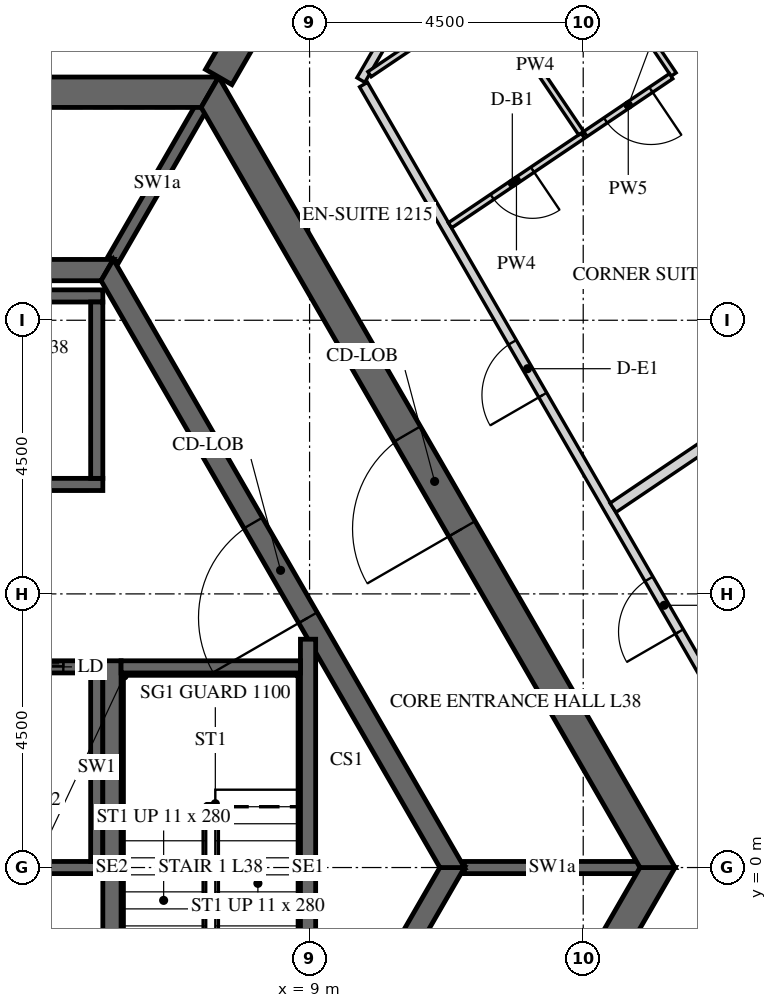
"""IFC4 building model, lengths in metres.
Left out: names, types, materials, properties, quantities, classifications, styles, units other than length and angle.
Written with IfcOpenShell. Run it as: python <this file> out.ifc"""

import sys

from ifc_helpers import new_model, si_unit, direction, frame, frame_2d, origin, place, context, subcontext, project, spatial, polyline, rectangle, outline, extrude, element, fill, save


model = new_model("IFC4")
c1 = context("Model", 3, precision=1e-05, world=origin(), true_north=direction((0.0, 1.0)))
c2 = subcontext(c1, "Body", "Model", "MODEL_VIEW")
j1 = project(units=[si_unit("LENGTHUNIT", "METRE"), si_unit("PLANEANGLEUNIT", "RADIAN")], contexts=[c1])
p1 = place(None, origin())
s1 = spatial("IfcSite", under=j1, at=p1, CompositionType="ELEMENT")
p2 = place(p1, origin())
s2 = spatial("IfcBuilding", under=s1, at=p2, CompositionType="ELEMENT")
p3 = place(p2, frame((0.0, 0.0, 164.4)))
s3 = spatial("IfcBuildingStorey", under=s2, at=p3, CompositionType="ELEMENT", Elevation=164.4)
p4 = place(p3, frame((7.361, -12.75, -0.15), z_axis=(0.0, 0.0, 1.0), x_axis=(0.50000571537, 0.866022103989, 0.0)))
e1 = element("IfcWall", 1, at=p4, inside=s3, PredefinedType="SHEAR", context=c2, shape_type="SweptSolid", body=[
    extrude(outline(polyline([(-0.144, -0.25), (14.867, -0.25), (14.578, 0.25), (0.144, 0.25), (-0.144, -0.25)])), origin(), (0.0, 0.0, 1.0), 3.9),
])
p5 = place(p4, frame((6.49, 0.0, 0.15)))
e2 = element("IfcOpeningElement", 2, at=p5, cuts=e1, PredefinedType="OPENING", context=c2, shape_type="SweptSolid", body=[
    extrude(rectangle(XDim=1.8, YDim=2.4, at=frame_2d((0.9, 1.2))), frame((0.0, 0.26, 0.0), z_axis=(0.0, -1.0, 0.0), x_axis=(1.0, 0.0, 0.0)), (0.0, 0.0, 1.0), 0.52),
])
p6 = place(p3, frame((14.722, 0.0, -0.15), z_axis=(0.0, 0.0, 1.0), x_axis=(-0.50000571537, 0.866022103989, 0.0)))
e3 = element("IfcWall", 3, at=p6, inside=s3, PredefinedType="SHEAR", context=c2, shape_type="SweptSolid", body=[
    extrude(outline(polyline([(-0.144, -0.25), (14.867, -0.25), (14.578, 0.25), (0.144, 0.25), (-0.144, -0.25)])), origin(), (0.0, 0.0, 1.0), 3.9),
])
p7 = place(p6, frame((6.432, 0.0, 0.15)))
e4 = element("IfcOpeningElement", 4, at=p7, cuts=e3, PredefinedType="OPENING", context=c2, shape_type="SweptSolid", body=[
    extrude(rectangle(XDim=1.8, YDim=2.4, at=frame_2d((0.9, 1.2))), frame((0.0, 0.26, 0.0), z_axis=(0.0, -1.0, 0.0), x_axis=(1.0, 0.0, 0.0)), (0.0, 0.0, 1.0), 0.52),
])
p8 = place(p3, frame((7.361, 12.75, -0.15), z_axis=(0.0, 0.0, 1.0), x_axis=(-1.0, 0.0, 0.0)))
e5 = element("IfcWall", 5, at=p8, inside=s3, PredefinedType="SHEAR", context=c2, shape_type="SweptSolid", body=[
    extrude(outline(polyline([(-0.144, -0.25), (14.866, -0.25), (14.578, 0.25), (0.144, 0.25), (-0.144, -0.25)])), origin(), (0.0, 0.0, 1.0), 3.9),
])
p9 = place(p8, frame((6.761, 0.0, 0.15)))
e6 = element("IfcOpeningElement", 6, at=p9, cuts=e5, PredefinedType="OPENING", context=c2, shape_type="SweptSolid", body=[
    extrude(rectangle(XDim=1.2, YDim=2.4, at=frame_2d((0.6, 1.2))), frame((0.0, 0.26, 0.0), z_axis=(0.0, -1.0, 0.0), x_axis=(1.0, 0.0, 0.0)), (0.0, 0.0, 1.0), 0.52),
])
p10 = place(p3, frame((7.506, 13.0, -0.15), z_axis=(0.0, 0.0, 1.0), x_axis=(0.499988271576, 0.866032175087, 0.0)))
e7 = element("IfcWall", 7, at=p10, inside=s3, PredefinedType="SHEAR", context=c2, shape_type="SweptSolid", body=[
    extrude(rectangle(XDim=15.424, YDim=0.5, at=frame_2d((7.712, 0.0))), origin(), (0.0, 0.0, 1.0), 3.9),
])
p11 = place(p10, frame((6.812, 0.0, 0.15)))
e8 = element("IfcOpeningElement", 8, at=p11, cuts=e7, PredefinedType="OPENING", context=c2, shape_type="SweptSolid", body=[
    extrude(rectangle(XDim=1.8, YDim=2.4, at=frame_2d((0.9, 1.2))), frame((0.0, 0.26, 0.0), z_axis=(0.0, -1.0, 0.0), x_axis=(1.0, 0.0, 0.0)), (0.0, 0.0, 1.0), 0.52),
])
p12 = place(p3, frame((5.673, -9.825, -0.15), z_axis=(0.0, 0.0, 1.0), x_axis=(0.499995046907, 0.866028263435, 0.0)))
e9 = element("IfcWall", 9, at=p12, inside=s3, PredefinedType="SHEAR", context=c2, shape_type="SweptSolid", body=[
    extrude(outline(polyline([(-0.101, -0.175), (11.446, -0.175), (11.244, 0.175), (0.101, 0.175), (-0.101, -0.175)])), origin(), (0.0, 0.0, 1.0), 3.9),
])
p13 = place(p12, frame((4.801, 0.0, 0.15)))
e10 = element("IfcOpeningElement", 10, at=p13, cuts=e9, PredefinedType="OPENING", context=c2, shape_type="SweptSolid", body=[
    extrude(rectangle(XDim=1.8, YDim=2.4, at=frame_2d((0.9, 1.2))), frame((0.0, 0.185, 0.0), z_axis=(0.0, -1.0, 0.0), x_axis=(1.0, 0.0, 0.0)), (0.0, 0.0, 1.0), 0.37),
])
p14 = place(p3, frame((11.345, 0.0, -0.15), z_axis=(0.0, 0.0, 1.0), x_axis=(-0.499995046907, 0.866028263435, 0.0)))
e11 = element("IfcWall", 11, at=p14, inside=s3, PredefinedType="SHEAR", context=c2, shape_type="SweptSolid", body=[
    extrude(outline(polyline([(-0.101, -0.175), (11.446, -0.175), (11.244, 0.175), (0.101, 0.175), (-0.101, -0.175)])), origin(), (0.0, 0.0, 1.0), 3.9),
])
p15 = place(p14, frame((4.744, 0.0, 0.15)))
e12 = element("IfcOpeningElement", 12, at=p15, cuts=e11, PredefinedType="OPENING", context=c2, shape_type="SweptSolid", body=[
    extrude(rectangle(XDim=1.8, YDim=2.4, at=frame_2d((0.9, 1.2))), frame((0.0, 0.185, 0.0), z_axis=(0.0, -1.0, 0.0), x_axis=(1.0, 0.0, 0.0)), (0.0, 0.0, 1.0), 0.37),
])
p16 = place(p3, frame((5.673, 9.825, -0.15), z_axis=(0.0, 0.0, 1.0), x_axis=(-1.0, 0.0, 0.0)))
e13 = element("IfcWall", 13, at=p16, inside=s3, PredefinedType="SHEAR", context=c2, shape_type="SweptSolid", body=[
    extrude(outline(polyline([(-0.101, -0.175), (11.446, -0.175), (11.244, 0.175), (0.101, 0.175), (-0.101, -0.175)])), origin(), (0.0, 0.0, 1.0), 3.9),
])
p17 = place(p3, frame((-5.6, 6.3, -0.25), z_axis=(0.0, 0.0, 1.0), x_axis=(1.0, 0.0, 0.0)))
e14 = element("IfcWall", 14, at=p17, inside=s3, PredefinedType="SHEAR", context=c2, shape_type="SweptSolid", body=[
    extrude(rectangle(XDim=11.2, YDim=0.2, at=frame_2d((5.6, 0.0))), origin(), (0.0, 0.0, 1.0), 3.9),
])
p18 = place(p17, frame((8.45, 0.0, 0.25)))
e15 = element("IfcOpeningElement", 15, at=p18, cuts=e14, PredefinedType="OPENING", context=c2, shape_type="SweptSolid", body=[
    extrude(rectangle(XDim=0.9, YDim=2.1, at=frame_2d((0.45, 1.05))), frame((0.0, 0.11, 0.0), z_axis=(0.0, -1.0, 0.0), x_axis=(1.0, 0.0, 0.0)), (0.0, 0.0, 1.0), 0.22),
])
p19 = place(p17, frame((0.65, 0.0, 0.25)))
e16 = element("IfcOpeningElement", 16, at=p19, cuts=e14, PredefinedType="OPENING", context=c2, shape_type="SweptSolid", body=[
    extrude(rectangle(XDim=1.1, YDim=2.1, at=frame_2d((0.55, 1.05))), frame((0.0, 0.11, 0.0), z_axis=(0.0, -1.0, 0.0), x_axis=(1.0, 0.0, 0.0)), (0.0, 0.0, 1.0), 0.22),
])
p20 = place(p17, frame((2.85, 0.0, 0.25)))
e17 = element("IfcOpeningElement", 17, at=p20, cuts=e14, PredefinedType="OPENING", context=c2, shape_type="SweptSolid", body=[
    extrude(rectangle(XDim=1.1, YDim=2.1, at=frame_2d((0.55, 1.05))), frame((0.0, 0.11, 0.0), z_axis=(0.0, -1.0, 0.0), x_axis=(1.0, 0.0, 0.0)), (0.0, 0.0, 1.0), 0.22),
])
p21 = place(p17, frame((5.05, 0.0, 0.25)))
e18 = element("IfcOpeningElement", 18, at=p21, cuts=e14, PredefinedType="OPENING", context=c2, shape_type="SweptSolid", body=[
    extrude(rectangle(XDim=1.1, YDim=2.1, at=frame_2d((0.55, 1.05))), frame((0.0, 0.11, 0.0), z_axis=(0.0, -1.0, 0.0), x_axis=(1.0, 0.0, 0.0)), (0.0, 0.0, 1.0), 0.22),
])
p22 = place(p3, frame((-5.6, 9.4, -0.25), z_axis=(0.0, 0.0, 1.0), x_axis=(1.0, 0.0, 0.0)))
e19 = element("IfcWall", 19, at=p22, inside=s3, PredefinedType="SHEAR", context=c2, shape_type="SweptSolid", body=[
    extrude(rectangle(XDim=11.2, YDim=0.2, at=frame_2d((5.6, 0.0))), origin(), (0.0, 0.0, 1.0), 3.9),
])
p23 = place(p3, frame((5.5, 6.4, -0.25), z_axis=(0.0, 0.0, 1.0), x_axis=(0.0, 1.0, 0.0)))
e20 = element("IfcWall", 20, at=p23, inside=s3, PredefinedType="SHEAR", context=c2, shape_type="SweptSolid", body=[
    extrude(rectangle(XDim=2.9, YDim=0.2, at=frame_2d((1.45, 0.0))), origin(), (0.0, 0.0, 1.0), 3.9),
])
p24 = place(p3, frame((-5.6, 3.3, -0.25), z_axis=(0.0, 0.0, 1.0), x_axis=(1.0, 0.0, 0.0)))
e21 = element("IfcWall", 21, at=p24, inside=s3, PredefinedType="SHEAR", context=c2, shape_type="SweptSolid", body=[
    extrude(rectangle(XDim=11.2, YDim=0.2, at=frame_2d((5.6, 0.0))), origin(), (0.0, 0.0, 1.0), 3.9),
])
p25 = place(p24, frame((0.65, 0.0, 0.25)))
e22 = element("IfcOpeningElement", 22, at=p25, cuts=e21, PredefinedType="OPENING", context=c2, shape_type="SweptSolid", body=[
    extrude(rectangle(XDim=1.1, YDim=2.1, at=frame_2d((0.55, 1.05))), frame((0.0, 0.11, 0.0), z_axis=(0.0, -1.0, 0.0), x_axis=(1.0, 0.0, 0.0)), (0.0, 0.0, 1.0), 0.22),
])
p26 = place(p24, frame((2.85, 0.0, 0.25)))
e23 = element("IfcOpeningElement", 23, at=p26, cuts=e21, PredefinedType="OPENING", context=c2, shape_type="SweptSolid", body=[
    extrude(rectangle(XDim=1.1, YDim=2.1, at=frame_2d((0.55, 1.05))), frame((0.0, 0.11, 0.0), z_axis=(0.0, -1.0, 0.0), x_axis=(1.0, 0.0, 0.0)), (0.0, 0.0, 1.0), 0.22),
])
p27 = place(p24, frame((5.05, 0.0, 0.25)))
e24 = element("IfcOpeningElement", 24, at=p27, cuts=e21, PredefinedType="OPENING", context=c2, shape_type="SweptSolid", body=[
    extrude(rectangle(XDim=1.1, YDim=2.1, at=frame_2d((0.55, 1.05))), frame((0.0, 0.11, 0.0), z_axis=(0.0, -1.0, 0.0), x_axis=(1.0, 0.0, 0.0)), (0.0, 0.0, 1.0), 0.22),
])
p28 = place(p24, frame((7.25, 0.0, 0.25)))
e25 = element("IfcOpeningElement", 25, at=p28, cuts=e21, PredefinedType="OPENING", context=c2, shape_type="SweptSolid", body=[
    extrude(rectangle(XDim=1.1, YDim=2.1, at=frame_2d((0.55, 1.05))), frame((0.0, 0.11, 0.0), z_axis=(0.0, -1.0, 0.0), x_axis=(1.0, 0.0, 0.0)), (0.0, 0.0, 1.0), 0.22),
])
p29 = place(p24, frame((9.45, 0.0, 0.25)))
e26 = element("IfcOpeningElement", 26, at=p29, cuts=e21, PredefinedType="OPENING", context=c2, shape_type="SweptSolid", body=[
    extrude(rectangle(XDim=1.1, YDim=2.1, at=frame_2d((0.55, 1.05))), frame((0.0, 0.11, 0.0), z_axis=(0.0, -1.0, 0.0), x_axis=(1.0, 0.0, 0.0)), (0.0, 0.0, 1.0), 0.22),
])
p30 = place(p3, frame((-5.6, 0.0, -0.25), z_axis=(0.0, 0.0, 1.0), x_axis=(1.0, 0.0, 0.0)))
e27 = element("IfcWall", 27, at=p30, inside=s3, PredefinedType="SHEAR", context=c2, shape_type="SweptSolid", body=[
    extrude(rectangle(XDim=11.2, YDim=0.2, at=frame_2d((5.6, 0.0))), origin(), (0.0, 0.0, 1.0), 3.9),
])
p31 = place(p3, frame((5.5, 0.1, -0.25), z_axis=(0.0, 0.0, 1.0), x_axis=(0.0, 1.0, 0.0)))
e28 = element("IfcWall", 28, at=p31, inside=s3, PredefinedType="SHEAR", context=c2, shape_type="SweptSolid", body=[
    extrude(rectangle(XDim=3.1, YDim=0.2, at=frame_2d((1.55, 0.0))), origin(), (0.0, 0.0, 1.0), 3.9),
])
for number, where, z_axis, x_axis in (
    (29, (11.547, 0.0, -0.15), (0.0, 0.0, 1.0), (1.0, 0.0, 0.0)),
    (30, (5.773, 10.0, -0.15), (0.0, 0.0, 1.0), (0.5, 0.866, 0.0)),
):
    element("IfcWall", number, at=place(p3, frame(where, z_axis=z_axis, x_axis=x_axis)), inside=s3, PredefinedType="SHEAR", context=c2, shape_type="SweptSolid", body=[
        extrude(rectangle(XDim=2.887, YDim=0.2, at=frame_2d((1.443, 0.0))), origin(), (0.0, 0.0, 1.0), 3.9),
    ])
p32 = place(p3, frame((5.75, -3.4, -0.25), z_axis=(0.0, 0.0, 1.0), x_axis=(0.0, 1.0, 0.0)))
e31 = element("IfcWall", 31, at=p32, inside=s3, PredefinedType="SHEAR", context=c2, shape_type="SweptSolid", body=[
    extrude(rectangle(XDim=6.8, YDim=0.3, at=frame_2d((3.4, 0.0))), origin(), (0.0, 0.0, 1.0), 3.9),
])
p33 = place(p3, frame((8.975, -3.755, -0.25), z_axis=(0.0, 0.0, 1.0), x_axis=(0.0, 1.0, 0.0)))
e32 = element("IfcWall", 32, at=p33, inside=s3, PredefinedType="SHEAR", context=c2, shape_type="SweptSolid", body=[
    extrude(rectangle(XDim=7.51, YDim=0.25, at=frame_2d((3.755, 0.0))), origin(), (0.0, 0.0, 1.0), 3.9),
])
p34 = place(p3, frame((5.9, 3.3, -0.25), z_axis=(0.0, 0.0, 1.0), x_axis=(1.0, 0.0, 0.0)))
e33 = element("IfcWall", 33, at=p34, inside=s3, PredefinedType="SHEAR", context=c2, shape_type="SweptSolid", body=[
    extrude(rectangle(XDim=2.95, YDim=0.2, at=frame_2d((1.475, 0.0))), origin(), (0.0, 0.0, 1.0), 3.9),
])
p35 = place(p3, frame((10.887, -11.144, 0.0), z_axis=(0.0, 0.0, 1.0), x_axis=(0.500006037985, 0.866021917724, 0.0)))
e34 = element("IfcWall", 34, at=p35, inside=s3, PredefinedType="PARTITIONING", context=c2, shape_type="SweptSolid", body=[
    extrude(rectangle(XDim=12.867, YDim=0.15, at=frame_2d((6.434, 0.0))), origin(), (0.0, 0.0, 1.0), 2.988),
])
p36 = place(p35, frame((6.225, 0.0, 0.0)))
e35 = element("IfcOpeningElement", 35, at=p36, cuts=e34, PredefinedType="OPENING", context=c2, shape_type="SweptSolid", body=[
    extrude(rectangle(XDim=1.0, YDim=2.1, at=frame_2d((0.5, 1.05))), frame((0.0, 0.085, 0.0), z_axis=(0.0, -1.0, 0.0), x_axis=(1.0, 0.0, 0.0)), (0.0, 0.0, 1.0), 0.17),
])
p37 = place(p35, frame((11.717, 0.0, 0.0)))
e36 = element("IfcOpeningElement", 36, at=p37, cuts=e34, PredefinedType="OPENING", context=c2, shape_type="SweptSolid", body=[
    extrude(rectangle(XDim=1.0, YDim=2.1, at=frame_2d((0.5, 1.05))), frame((0.0, 0.085, 0.0), z_axis=(0.0, -1.0, 0.0), x_axis=(1.0, 0.0, 0.0)), (0.0, 0.0, 1.0), 0.17),
])
p38 = place(p3, frame((17.277, 0.075, 0.0), z_axis=(0.0, 0.0, 1.0), x_axis=(-0.499988884089, 0.866031821464, 0.0)))
e37 = element("IfcWall", 37, at=p38, inside=s3, PredefinedType="PARTITIONING", context=c2, shape_type="SweptSolid", body=[
    extrude(rectangle(XDim=14.78, YDim=0.15, at=frame_2d((7.39, 0.0))), origin(), (0.0, 0.0, 1.0), 2.988),
])
p39 = place(p38, frame((4.393, 0.0, 0.0)))
e38 = element("IfcOpeningElement", 38, at=p39, cuts=e37, PredefinedType="OPENING", context=c2, shape_type="SweptSolid", body=[
    extrude(rectangle(XDim=1.0, YDim=2.1, at=frame_2d((0.5, 1.05))), frame((0.0, 0.085, 0.0), z_axis=(0.0, -1.0, 0.0), x_axis=(1.0, 0.0, 0.0)), (0.0, 0.0, 1.0), 0.17),
])
p40 = place(p38, frame((8.885, 0.0, 0.0)))
e39 = element("IfcOpeningElement", 39, at=p40, cuts=e37, PredefinedType="OPENING", context=c2, shape_type="SweptSolid", body=[
    extrude(rectangle(XDim=1.0, YDim=2.1, at=frame_2d((0.5, 1.05))), frame((0.0, 0.085, 0.0), z_axis=(0.0, -1.0, 0.0), x_axis=(1.0, 0.0, 0.0)), (0.0, 0.0, 1.0), 0.17),
])
p41 = place(p3, frame((9.844, 12.95, 0.0), z_axis=(0.0, 0.0, 1.0), x_axis=(0.500003831281, 0.866023191782, 0.0)))
e40 = element("IfcWall", 40, at=p41, inside=s3, PredefinedType="PARTITIONING", context=c2, shape_type="SweptSolid", body=[
    extrude(rectangle(XDim=7.786, YDim=0.15, at=frame_2d((3.893, 0.0))), origin(), (0.0, 0.0, 1.0), 2.988),
])
p42 = place(p3, frame((24.389, 12.931, 0.0), z_axis=(0.0, 0.0, 1.0), x_axis=(-0.829040439793, -0.559188652593, 0.0)))
e41 = element("IfcWall", 41, at=p42, inside=s3, PredefinedType="PARTITIONING", context=c2, shape_type="SweptSolid", body=[
    extrude(rectangle(XDim=12.542, YDim=0.18, at=frame_2d((6.271, 0.0))), origin(), (0.0, 0.0, 1.0), 2.988),
])
p43 = place(p3, frame((9.986, 13.046, 0.0), z_axis=(0.0, 0.0, 1.0), x_axis=(0.829041811541, 0.559186618865, 0.0)))
e42 = element("IfcWall", 42, at=p43, inside=s3, PredefinedType="PARTITIONING", context=c2, shape_type="SweptSolid", body=[
    extrude(rectangle(XDim=2.344, YDim=0.1, at=frame_2d((1.172, 0.0))), origin(), (0.0, 0.0, 1.0), 2.988),
])
p44 = place(p3, frame((13.495, 12.035, 0.0), z_axis=(0.0, 0.0, 1.0), x_axis=(-0.829031183816, -0.55920237505, 0.0)))
e43 = element("IfcWall", 43, at=p44, inside=s3, PredefinedType="PARTITIONING", context=c2, shape_type="SweptSolid", body=[
    extrude(rectangle(XDim=2.636, YDim=0.1, at=frame_2d((1.318, 0.0))), origin(), (0.0, 0.0, 1.0), 2.988),
])
p45 = place(p44, frame((1.0, 0.0, 0.0)))
e44 = element("IfcOpeningElement", 44, at=p45, cuts=e43, PredefinedType="OPENING", context=c2, shape_type="SweptSolid", body=[
    extrude(rectangle(XDim=0.8, YDim=2.1, at=frame_2d((0.4, 1.05))), frame((0.0, 0.06, 0.0), z_axis=(0.0, -1.0, 0.0), x_axis=(1.0, 0.0, 0.0)), (0.0, 0.0, 1.0), 0.12),
])
p46 = place(p3, frame((13.449, 15.322, 0.0), z_axis=(0.0, 0.0, 1.0), x_axis=(0.559158698756, -0.8290606429, 0.0)))
e45 = element("IfcWall", 45, at=p46, inside=s3, PredefinedType="PARTITIONING", context=c2, shape_type="SweptSolid", body=[
    extrude(rectangle(XDim=2.75, YDim=0.1, at=frame_2d((1.375, 0.0))), origin(), (0.0, 0.0, 1.0), 2.988),
])
p47 = place(p3, frame((14.946, 13.014, 0.0), z_axis=(0.0, 0.0, 1.0), x_axis=(-0.829033422808, -0.559199055675, 0.0)))
e46 = element("IfcWall", 46, at=p47, inside=s3, PredefinedType="PARTITIONING", context=c2, shape_type="SweptSolid", body=[
    extrude(rectangle(XDim=1.7, YDim=0.1, at=frame_2d((0.85, 0.0))), origin(), (0.0, 0.0, 1.0), 2.988),
])
p48 = place(p47, frame((0.4, 0.0, 0.0)))
e47 = element("IfcOpeningElement", 47, at=p48, cuts=e46, PredefinedType="OPENING", context=c2, shape_type="SweptSolid", body=[
    extrude(rectangle(XDim=0.9, YDim=2.1, at=frame_2d((0.45, 1.05))), frame((0.0, 0.06, 0.0), z_axis=(0.0, -1.0, 0.0), x_axis=(1.0, 0.0, 0.0)), (0.0, 0.0, 1.0), 0.12),
])
p49 = place(p3, frame((18.591, 9.129, 0.0), z_axis=(0.0, 0.0, 1.0), x_axis=(-0.559185029686, 0.829042883435, 0.0)))
e48 = element("IfcWall", 48, at=p49, inside=s3, PredefinedType="PARTITIONING", context=c2, shape_type="SweptSolid", body=[
    extrude(rectangle(XDim=7.11, YDim=0.1, at=frame_2d((3.555, 0.0))), origin(), (0.0, 0.0, 1.0), 2.988),
])
p50 = place(p49, frame((3.06, 0.0, 0.0)))
e49 = element("IfcOpeningElement", 49, at=p50, cuts=e48, PredefinedType="OPENING", context=c2, shape_type="SweptSolid", body=[
    extrude(rectangle(XDim=0.9, YDim=2.1, at=frame_2d((0.45, 1.05))), frame((0.0, 0.06, 0.0), z_axis=(0.0, -1.0, 0.0), x_axis=(1.0, 0.0, 0.0)), (0.0, 0.0, 1.0), 0.12),
])
p51 = place(p3, frame((13.467, 12.077, 0.0), z_axis=(0.0, 0.0, 1.0), x_axis=(-0.559261631576, 0.828991210718, 0.0)))
e50 = element("IfcWall", 50, at=p51, inside=s3, PredefinedType="PARTITIONING", context=c2, shape_type="SweptSolid", body=[
    extrude(rectangle(XDim=2.7, YDim=0.1, at=frame_2d((1.35, 0.0))), origin(), (0.0, 0.0, 1.0), 2.988),
])
p52 = place(p7, origin())
e51 = element("IfcDoor", 51, at=p52, inside=s3, OperationType="DOUBLE_DOOR_SINGLE_SWING", PredefinedType="DOOR", context=c2, shape_type="SweptSolid", body=[
    extrude(rectangle(XDim=1.8, YDim=2.4, at=frame_2d((0.9, 1.2))), frame((0.0, 0.025, 0.0), z_axis=(0.0, -1.0, 0.0), x_axis=(1.0, 0.0, 0.0)), (0.0, 0.0, 1.0), 0.05),
])
fill(e4, e51)
p53 = place(p15, origin())
e52 = element("IfcDoor", 52, at=p53, inside=s3, OperationType="DOUBLE_DOOR_SINGLE_SWING", PredefinedType="DOOR", context=c2, shape_type="SweptSolid", body=[
    extrude(rectangle(XDim=1.8, YDim=2.4, at=frame_2d((0.9, 1.2))), frame((0.0, 0.025, 0.0), z_axis=(0.0, -1.0, 0.0), x_axis=(1.0, 0.0, 0.0)), (0.0, 0.0, 1.0), 0.05),
])
fill(e12, e52)
p54 = place(p29, origin())
e53 = element("IfcDoor", 53, at=p54, inside=s3, OperationType="SLIDING_TO_LEFT", PredefinedType="DOOR", context=c2, shape_type="SweptSolid", body=[
    extrude(rectangle(XDim=1.1, YDim=2.1, at=frame_2d((0.55, 1.05))), frame((0.0, 0.025, 0.0), z_axis=(0.0, -1.0, 0.0), x_axis=(1.0, 0.0, 0.0)), (0.0, 0.0, 1.0), 0.05),
])
fill(e26, e53)
p55 = place(p39, origin())
e54 = element("IfcDoor", 54, at=p55, inside=s3, OperationType="SINGLE_SWING_LEFT", PredefinedType="DOOR", context=c2, shape_type="SweptSolid", body=[
    extrude(rectangle(XDim=1.0, YDim=2.1, at=frame_2d((0.5, 1.05))), frame((0.0, 0.025, 0.0), z_axis=(0.0, -1.0, 0.0), x_axis=(1.0, 0.0, 0.0)), (0.0, 0.0, 1.0), 0.05),
])
fill(e38, e54)
p56 = place(p40, origin())
e55 = element("IfcDoor", 55, at=p56, inside=s3, OperationType="SINGLE_SWING_RIGHT", PredefinedType="DOOR", context=c2, shape_type="SweptSolid", body=[
    extrude(rectangle(XDim=1.0, YDim=2.1, at=frame_2d((0.5, 1.05))), frame((0.0, 0.025, 0.0), z_axis=(0.0, -1.0, 0.0), x_axis=(1.0, 0.0, 0.0)), (0.0, 0.0, 1.0), 0.05),
])
fill(e39, e55)
p57 = place(p45, origin())
e56 = element("IfcDoor", 56, at=p57, inside=s3, OperationType="SINGLE_SWING_LEFT", PredefinedType="DOOR", context=c2, shape_type="SweptSolid", body=[
    extrude(rectangle(XDim=0.8, YDim=2.1, at=frame_2d((0.4, 1.05))), frame((0.0, 0.025, 0.0), z_axis=(0.0, -1.0, 0.0), x_axis=(1.0, 0.0, 0.0)), (0.0, 0.0, 1.0), 0.05),
])
fill(e44, e56)
p58 = place(p48, origin())
e57 = element("IfcDoor", 57, at=p58, inside=s3, OperationType="SINGLE_SWING_RIGHT", PredefinedType="DOOR", context=c2, shape_type="SweptSolid", body=[
    extrude(rectangle(XDim=0.9, YDim=2.1, at=frame_2d((0.45, 1.05))), frame((0.0, 0.025, 0.0), z_axis=(0.0, -1.0, 0.0), x_axis=(1.0, 0.0, 0.0)), (0.0, 0.0, 1.0), 0.05),
])
fill(e47, e57)
save(model, sys.argv[1])
